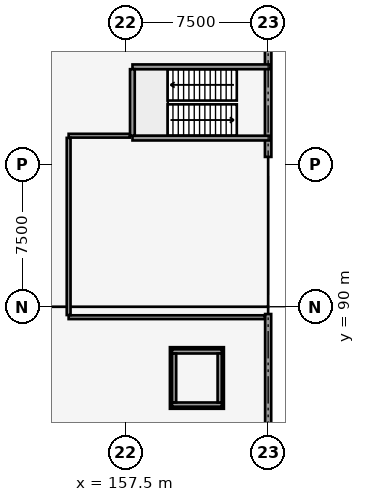
"""IFC4 building model, lengths in metres.
Left out: names, types, materials, properties, quantities, classifications, styles, units other than length and angle.
Written with IfcOpenShell. Run it as: python <this file> out.ifc"""

import sys

from ifc_helpers import new_model, si_unit, direction, frame, frame_2d, origin, origin_2d, place, context, subcontext, project, spatial, rectangle, extrude, element, fill, save


model = new_model("IFC4")
c1 = context("Model", 3, precision=1e-05, world=origin(), true_north=direction((0.0, 1.0)))
c2 = subcontext(c1, "Body", "Model", "MODEL_VIEW")
j1 = project(units=[si_unit("LENGTHUNIT", "METRE"), si_unit("PLANEANGLEUNIT", "RADIAN")], contexts=[c1])
p1 = place(None, origin())
s1 = spatial("IfcSite", under=j1, at=p1, CompositionType="ELEMENT")
p2 = place(p1, origin())
s2 = spatial("IfcBuilding", under=s1, at=p2, CompositionType="ELEMENT")
p3 = place(p2, origin())
s3 = spatial("IfcBuildingStorey", under=s2, at=p3, CompositionType="ELEMENT", Elevation=0.0)
for number, where, z_axis, x_axis in (
    (1, (157.5, 90.0, 0.0), (0.0, 0.0, 1.0), (1.0, 0.0, 0.0)),
    (2, (157.5, 97.5, 0.0), (0.0, 0.0, 1.0), (1.0, 0.0, 0.0)),
    (3, (165.0, 90.0, 0.0), (0.0, 0.0, 1.0), (1.0, 0.0, 0.0)),
    (4, (165.0, 97.5, 0.0), (0.0, 0.0, 1.0), (1.0, 0.0, 0.0)),
):
    element("IfcColumn", number, at=place(p3, frame(where, z_axis=z_axis, x_axis=x_axis)), inside=s3, PredefinedType="COLUMN", context=c2, shape_type="SweptSolid", body=[
        extrude(rectangle(XDim=0.75, YDim=0.75, at=origin_2d()), origin(), (0.0, 0.0, 1.0), 4.8),
    ])
p4 = place(p3, frame((165.0, 86.25, 0.0), z_axis=(0.0, 0.0, 1.0), x_axis=(1.0, 0.0, 0.0)))
e5 = element("IfcColumn", 5, at=p4, inside=s3, PredefinedType="PILASTER", context=c2, shape_type="SweptSolid", body=[
    extrude(rectangle(XDim=0.4, YDim=0.7, at=origin_2d()), origin(), (0.0, 0.0, 1.0), 4.8),
])
p5 = place(p3, frame((165.0, 82.885, 0.0), z_axis=(0.0, 0.0, 1.0), x_axis=(0.0, 1.0, 0.0)))
e6 = element("IfcWall", 6, at=p5, inside=s3, PredefinedType="SOLIDWALL", context=c2, shape_type="SweptSolid", body=[
    extrude(rectangle(XDim=6.73, YDim=0.32, at=frame_2d((3.365, 0.0))), origin(), (0.0, 0.0, 1.0), 3.62),
])
p6 = place(p3, frame((165.0, 97.885, 0.0), z_axis=(0.0, 0.0, 1.0), x_axis=(0.0, 1.0, 0.0)))
e7 = element("IfcWall", 7, at=p6, inside=s3, PredefinedType="SOLIDWALL", context=c2, shape_type="SweptSolid", body=[
    extrude(rectangle(XDim=6.73, YDim=0.34, at=frame_2d((3.365, 0.0))), origin(), (0.0, 0.0, 1.0), 3.42),
])
p7 = place(p6, frame((2.252, 0.0, 0.0)))
e8 = element("IfcOpeningElement", 8, at=p7, cuts=e7, PredefinedType="OPENING", context=c2, shape_type="SweptSolid", body=[
    extrude(rectangle(XDim=1.6, YDim=2.15, at=frame_2d((0.8, 1.075))), frame((0.0, 0.18, 0.0), z_axis=(0.0, -1.0, 0.0), x_axis=(1.0, 0.0, 0.0)), (0.0, 0.0, 1.0), 0.36),
])
p8 = place(p3, frame((157.86, 98.875, 0.0), z_axis=(0.0, 0.0, 1.0), x_axis=(1.0, 0.0, 0.0)))
e9 = element("IfcWall", 9, at=p8, inside=s3, PredefinedType="SOLIDWALL", context=c2, shape_type="SweptSolid", body=[
    extrude(rectangle(XDim=7.26, YDim=0.25, at=frame_2d((3.63, 0.0))), origin(), (0.0, 0.0, 1.0), 4.5),
])
p9 = place(p3, frame((157.86, 102.625, 0.0), z_axis=(0.0, 0.0, 1.0), x_axis=(1.0, 0.0, 0.0)))
e10 = element("IfcWall", 10, at=p9, inside=s3, PredefinedType="SOLIDWALL", context=c2, shape_type="SweptSolid", body=[
    extrude(rectangle(XDim=7.26, YDim=0.25, at=frame_2d((3.63, 0.0))), origin(), (0.0, 0.0, 1.0), 4.5),
])
p10 = place(p9, frame((5.71, 0.0, 0.0)))
e11 = element("IfcOpeningElement", 11, at=p10, cuts=e10, PredefinedType="OPENING", context=c2, shape_type="SweptSolid", body=[
    extrude(rectangle(XDim=1.1, YDim=2.15, at=frame_2d((0.55, 1.075))), frame((0.0, 0.135, 0.0), z_axis=(0.0, -1.0, 0.0), x_axis=(1.0, 0.0, 0.0)), (0.0, 0.0, 1.0), 0.27),
])
p11 = place(p3, frame((157.855, 99.0, 0.0), z_axis=(0.0, 0.0, 1.0), x_axis=(0.0, 1.0, 0.0)))
e12 = element("IfcWall", 12, at=p11, inside=s3, PredefinedType="SOLIDWALL", context=c2, shape_type="SweptSolid", body=[
    extrude(rectangle(XDim=3.5, YDim=0.25, at=frame_2d((1.75, 0.0))), origin(), (0.0, 0.0, 1.0), 4.5),
])
for number, where, z_axis, x_axis in (
    (13, (159.94, 84.85, 0.0), (0.0, 0.0, 1.0), (1.0, 0.0, 0.0)),
    (14, (159.94, 87.65, 0.0), (0.0, 0.0, 1.0), (1.0, 0.0, 0.0)),
):
    element("IfcWall", number, at=place(p3, frame(where, z_axis=z_axis, x_axis=x_axis)), inside=s3, PredefinedType="SOLIDWALL", context=c2, shape_type="SweptSolid", body=[
        extrude(rectangle(XDim=2.62, YDim=0.22, at=frame_2d((1.31, 0.0))), origin(), (0.0, 0.0, 1.0), 4.5),
    ])
p12 = place(p3, frame((160.05, 84.96, 0.0), z_axis=(0.0, 0.0, 1.0), x_axis=(0.0, 1.0, 0.0)))
e15 = element("IfcWall", 15, at=p12, inside=s3, PredefinedType="SOLIDWALL", context=c2, shape_type="SweptSolid", body=[
    extrude(rectangle(XDim=2.58, YDim=0.22, at=frame_2d((1.29, 0.0))), origin(), (0.0, 0.0, 1.0), 4.5),
])
p13 = place(p12, frame((0.79, 0.0, 0.0)))
e16 = element("IfcOpeningElement", 16, at=p13, cuts=e15, PredefinedType="OPENING", context=c2, shape_type="SweptSolid", body=[
    extrude(rectangle(XDim=1.0, YDim=2.15, at=frame_2d((0.5, 1.075))), frame((0.0, 0.12, 0.0), z_axis=(0.0, -1.0, 0.0), x_axis=(1.0, 0.0, 0.0)), (0.0, 0.0, 1.0), 0.24),
])
p14 = place(p3, frame((162.45, 84.96, 0.0), z_axis=(0.0, 0.0, 1.0), x_axis=(0.0, 1.0, 0.0)))
e17 = element("IfcWall", 17, at=p14, inside=s3, PredefinedType="SOLIDWALL", context=c2, shape_type="SweptSolid", body=[
    extrude(rectangle(XDim=2.58, YDim=0.22, at=frame_2d((1.29, 0.0))), origin(), (0.0, 0.0, 1.0), 4.5),
])
p15 = place(p3, frame((154.5, 89.45, 0.0), z_axis=(0.0, 0.0, 1.0), x_axis=(1.0, 0.0, 0.0)))
e18 = element("IfcWall", 18, at=p15, inside=s3, PredefinedType="PARTITIONING", context=c2, shape_type="SweptSolid", body=[
    extrude(rectangle(XDim=10.326, YDim=0.2, at=frame_2d((5.163, 0.0))), origin(), (0.0, 0.0, 1.0), 3.42),
])
p16 = place(p3, frame((154.5, 99.0, 0.0), z_axis=(0.0, 0.0, 1.0), x_axis=(1.0, 0.0, 0.0)))
e19 = element("IfcWall", 19, at=p16, inside=s3, PredefinedType="PARTITIONING", context=c2, shape_type="SweptSolid", body=[
    extrude(rectangle(XDim=3.216, YDim=0.2, at=frame_2d((1.608, 0.0))), origin(), (0.0, 0.0, 1.0), 3.82),
])
p17 = place(p3, frame((154.5, 89.564, 0.0), z_axis=(0.0, 0.0, 1.0), x_axis=(0.0, 1.0, 0.0)))
e20 = element("IfcWall", 20, at=p17, inside=s3, PredefinedType="PARTITIONING", context=c2, shape_type="SweptSolid", body=[
    extrude(rectangle(XDim=9.322, YDim=0.2, at=frame_2d((4.661, 0.0))), origin(), (0.0, 0.0, 1.0), 3.42),
])
p18 = place(p17, frame((4.086, 0.0, 0.0)))
e21 = element("IfcOpeningElement", 21, at=p18, cuts=e20, PredefinedType="OPENING", context=c2, shape_type="SweptSolid", body=[
    extrude(rectangle(XDim=1.1, YDim=2.15, at=frame_2d((0.55, 1.075))), frame((0.0, 0.11, 0.0), z_axis=(0.0, -1.0, 0.0), x_axis=(1.0, 0.0, 0.0)), (0.0, 0.0, 1.0), 0.22),
])
p19 = place(p7, frame((1.6, 0.0, 0.0), z_axis=(0.0, 0.0, 1.0), x_axis=(-1.0, 0.0, 0.0)))
e22 = element("IfcDoor", 22, at=p19, inside=s3, OperationType="SINGLE_SWING_LEFT", PredefinedType="DOOR", context=c2, shape_type="SweptSolid", body=[
    extrude(rectangle(XDim=1.6, YDim=2.15, at=frame_2d((0.8, 1.075))), frame((0.0, 0.025, 0.0), z_axis=(0.0, -1.0, 0.0), x_axis=(1.0, 0.0, 0.0)), (0.0, 0.0, 1.0), 0.05),
])
fill(e8, e22)
p20 = place(p10, origin())
e23 = element("IfcDoor", 23, at=p20, inside=s3, OperationType="SINGLE_SWING_LEFT", PredefinedType="DOOR", context=c2, shape_type="SweptSolid", body=[
    extrude(rectangle(XDim=1.1, YDim=2.15, at=frame_2d((0.55, 1.075))), frame((0.0, 0.025, 0.0), z_axis=(0.0, -1.0, 0.0), x_axis=(1.0, 0.0, 0.0)), (0.0, 0.0, 1.0), 0.05),
])
fill(e11, e23)
p21 = place(p13, origin())
e24 = element("IfcDoor", 24, at=p21, inside=s3, OperationType="SLIDING_TO_LEFT", PredefinedType="DOOR", context=c2, shape_type="SweptSolid", body=[
    extrude(rectangle(XDim=1.0, YDim=2.15, at=frame_2d((0.5, 1.075))), frame((0.0, 0.025, 0.0), z_axis=(0.0, -1.0, 0.0), x_axis=(1.0, 0.0, 0.0)), (0.0, 0.0, 1.0), 0.05),
])
fill(e16, e24)
p22 = place(p18, origin())
e25 = element("IfcDoor", 25, at=p22, inside=s3, OperationType="SINGLE_SWING_LEFT", PredefinedType="DOOR", context=c2, shape_type="SweptSolid", body=[
    extrude(rectangle(XDim=1.1, YDim=2.15, at=frame_2d((0.55, 1.075))), frame((0.0, 0.025, 0.0), z_axis=(0.0, -1.0, 0.0), x_axis=(1.0, 0.0, 0.0)), (0.0, 0.0, 1.0), 0.05),
])
fill(e21, e25)
save(model, sys.argv[1])
